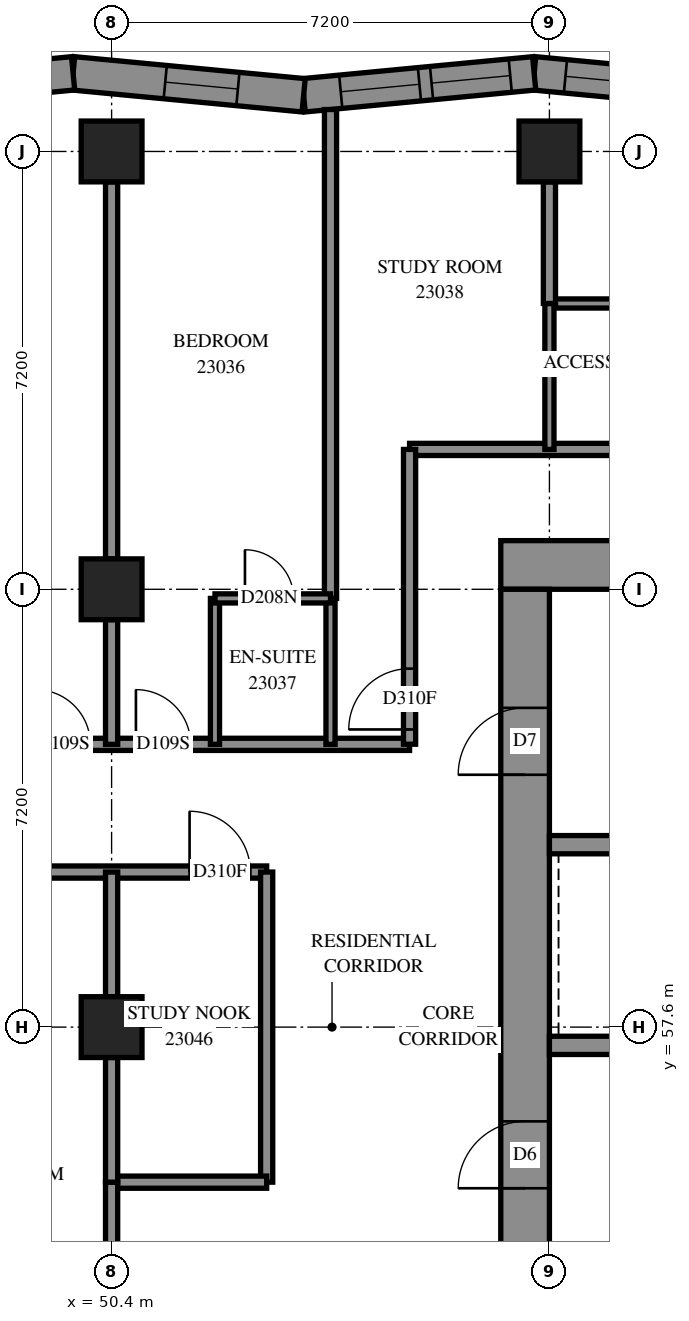
"""IFC4 building model, lengths in metres.
Left out: names, types, materials, properties, quantities, classifications, styles, units other than length and angle.
Written with IfcOpenShell. Run it as: python <this file> out.ifc"""

import sys

from ifc_helpers import new_model, si_unit, direction, frame, frame_2d, origin, origin_2d, place, context, subcontext, project, spatial, polyline, rectangle, outline, extrude, element, fill, save


model = new_model("IFC4")
c1 = context("Model", 3, precision=1e-05, world=origin(), true_north=direction((0.0, 1.0)))
c2 = subcontext(c1, "Body", "Model", "MODEL_VIEW")
j1 = project(units=[si_unit("LENGTHUNIT", "METRE"), si_unit("PLANEANGLEUNIT", "RADIAN")], contexts=[c1])
p1 = place(None, origin())
s1 = spatial("IfcSite", under=j1, at=p1, CompositionType="ELEMENT")
p2 = place(p1, origin())
s2 = spatial("IfcBuilding", under=s1, at=p2, CompositionType="ELEMENT")
p3 = place(p2, frame((0.0, 0.0, 88.0)))
s3 = spatial("IfcBuildingStorey", under=s2, at=p3, CompositionType="ELEMENT", Elevation=88.0)
for number, where, z_axis, x_axis in (
    (1, (50.4, 57.6, 0.0), (0.0, 0.0, 1.0), (1.0, 0.0, 0.0)),
    (2, (50.4, 64.8, 0.0), (0.0, 0.0, 1.0), (1.0, 0.0, 0.0)),
    (3, (50.4, 72.0, 0.0), (0.0, 0.0, 1.0), (1.0, 0.0, 0.0)),
    (4, (57.6, 72.0, 0.0), (0.0, 0.0, 1.0), (1.0, 0.0, 0.0)),
):
    element("IfcColumn", number, at=place(p3, frame(where, z_axis=z_axis, x_axis=x_axis)), inside=s3, PredefinedType="COLUMN", context=c2, shape_type="SweptSolid", body=[
        extrude(rectangle(XDim=1.0, YDim=1.0, at=origin_2d()), origin(), (0.0, 0.0, 1.0), 3.1),
    ])
p4 = place(p3, frame((56.8, 65.2, -0.3), z_axis=(0.0, 0.0, 1.0), x_axis=(1.0, 0.0, 0.0)))
e5 = element("IfcWall", 5, at=p4, inside=s3, PredefinedType="SHEAR", context=c2, shape_type="SweptSolid", body=[
    extrude(rectangle(XDim=16.0, YDim=0.8, at=frame_2d((8.0, 0.0))), origin(), (0.0, 0.0, 1.0), 2.7),
])
p5 = place(p4, frame((10.8, 0.0, 0.3)))
e6 = element("IfcOpeningElement", 6, at=p5, cuts=e5, PredefinedType="OPENING", context=c2, shape_type="SweptSolid", body=[
    extrude(rectangle(XDim=0.8, YDim=2.1, at=frame_2d((0.4, 1.05))), frame((0.0, 0.41, 0.0), z_axis=(0.0, -1.0, 0.0), x_axis=(1.0, 0.0, 0.0)), (0.0, 0.0, 1.0), 0.82),
])
p6 = place(p3, frame((57.2, 50.4, -0.3), z_axis=(0.0, 0.0, 1.0), x_axis=(0.0, 1.0, 0.0)))
e7 = element("IfcWall", 7, at=p6, inside=s3, PredefinedType="SHEAR", context=c2, shape_type="SweptSolid", body=[
    extrude(rectangle(XDim=14.4, YDim=0.8, at=frame_2d((7.2, 0.0))), origin(), (0.0, 0.0, 1.0), 2.7),
])
p7 = place(p6, frame((4.55, 0.0, 0.3)))
e8 = element("IfcOpeningElement", 8, at=p7, cuts=e7, PredefinedType="OPENING", context=c2, shape_type="SweptSolid", body=[
    extrude(rectangle(XDim=1.1, YDim=2.1, at=frame_2d((0.55, 1.05))), frame((0.0, 0.41, 0.0), z_axis=(0.0, -1.0, 0.0), x_axis=(1.0, 0.0, 0.0)), (0.0, 0.0, 1.0), 0.82),
])
p8 = place(p6, frame((11.35, 0.0, 0.3)))
e9 = element("IfcOpeningElement", 9, at=p8, cuts=e7, PredefinedType="OPENING", context=c2, shape_type="SweptSolid", body=[
    extrude(rectangle(XDim=1.1, YDim=2.1, at=frame_2d((0.55, 1.05))), frame((0.0, 0.41, 0.0), z_axis=(0.0, -1.0, 0.0), x_axis=(1.0, 0.0, 0.0)), (0.0, 0.0, 1.0), 0.82),
])
p9 = place(p3, frame((57.6, 57.3, 0.0), z_axis=(0.0, 0.0, 1.0), x_axis=(1.0, 0.0, 0.0)))
e10 = element("IfcWall", 10, at=p9, inside=s3, PredefinedType="SOLIDWALL", context=c2, shape_type="SweptSolid", body=[
    extrude(rectangle(XDim=14.4, YDim=0.3, at=frame_2d((7.2, 0.0))), origin(), (0.0, 0.0, 1.0), 3.1),
])
p10 = place(p9, frame((12.05, 0.0, 0.0)))
e11 = element("IfcOpeningElement", 11, at=p10, cuts=e10, PredefinedType="OPENING", context=c2, shape_type="SweptSolid", body=[
    extrude(rectangle(XDim=1.1, YDim=2.1, at=frame_2d((0.55, 1.05))), frame((0.0, 0.16, 0.0), z_axis=(0.0, -1.0, 0.0), x_axis=(1.0, 0.0, 0.0)), (0.0, 0.0, 1.0), 0.32),
])
p11 = place(p3, frame((57.6, 60.6, 0.0), z_axis=(0.0, 0.0, 1.0), x_axis=(1.0, 0.0, 0.0)))
e12 = element("IfcWall", 12, at=p11, inside=s3, PredefinedType="SOLIDWALL", context=c2, shape_type="SweptSolid", body=[
    extrude(rectangle(XDim=7.2, YDim=0.3, at=frame_2d((3.6, 0.0))), origin(), (0.0, 0.0, 1.0), 3.1),
])
p12 = place(p3, frame((61.14, 72.924, 0.0), z_axis=(0.0, 0.0, 1.0), x_axis=(-0.9954966527, 0.0947967005, 0.0)))
e13 = element("IfcWall", 13, at=p12, inside=s3, PredefinedType="SOLIDWALL", context=c2, shape_type="SweptSolid", body=[
    extrude(outline(polyline([(0.026, -0.275), (3.834, -0.275), (3.782, 0.275), (-0.026, 0.275), (0.026, -0.275)])), origin(), (0.0, 0.0, 1.0), 3.1),
])
p13 = place(p12, frame((0.491, 0.0, 0.5)))
e14 = element("IfcOpeningElement", 14, at=p13, cuts=e13, PredefinedType="OPENING", context=c2, shape_type="SweptSolid", body=[
    extrude(rectangle(XDim=1.3, YDim=2.45, at=frame_2d((0.65, 1.225))), frame((0.0, 0.285, 0.0), z_axis=(0.0, -1.0, 0.0), x_axis=(1.0, 0.0, 0.0)), (0.0, 0.0, 1.0), 0.57),
])
p14 = place(p12, frame((1.991, 0.0, 0.5)))
e15 = element("IfcOpeningElement", 15, at=p14, cuts=e13, PredefinedType="OPENING", context=c2, shape_type="SweptSolid", body=[
    extrude(rectangle(XDim=1.3, YDim=2.45, at=frame_2d((0.65, 1.225))), frame((0.0, 0.285, 0.0), z_axis=(0.0, -1.0, 0.0), x_axis=(1.0, 0.0, 0.0)), (0.0, 0.0, 1.0), 0.57),
])
p15 = place(p3, frame((57.349, 73.285, 0.0), z_axis=(0.0, 0.0, 1.0), x_axis=(-0.9954966527, -0.0947967005, 0.0)))
e16 = element("IfcWall", 16, at=p15, inside=s3, PredefinedType="SOLIDWALL", context=c2, shape_type="SweptSolid", body=[
    extrude(outline(polyline([(-0.026, -0.275), (3.782, -0.275), (3.834, 0.275), (0.026, 0.275), (-0.026, -0.275)])), origin(), (0.0, 0.0, 1.0), 3.1),
])
p16 = place(p15, frame((0.395, 0.0, 0.5)))
e17 = element("IfcOpeningElement", 17, at=p16, cuts=e16, PredefinedType="OPENING", context=c2, shape_type="SweptSolid", body=[
    extrude(rectangle(XDim=1.3, YDim=2.45, at=frame_2d((0.65, 1.225))), frame((0.0, 0.285, 0.0), z_axis=(0.0, -1.0, 0.0), x_axis=(1.0, 0.0, 0.0)), (0.0, 0.0, 1.0), 0.57),
])
p17 = place(p15, frame((1.895, 0.0, 0.5)))
e18 = element("IfcOpeningElement", 18, at=p17, cuts=e16, PredefinedType="OPENING", context=c2, shape_type="SweptSolid", body=[
    extrude(rectangle(XDim=1.3, YDim=2.45, at=frame_2d((0.65, 1.225))), frame((0.0, 0.285, 0.0), z_axis=(0.0, -1.0, 0.0), x_axis=(1.0, 0.0, 0.0)), (0.0, 0.0, 1.0), 0.57),
])
p18 = place(p3, frame((53.558, 72.924, 0.0), z_axis=(0.0, 0.0, 1.0), x_axis=(-0.9954966527, 0.0947967005, 0.0)))
e19 = element("IfcWall", 19, at=p18, inside=s3, PredefinedType="SOLIDWALL", context=c2, shape_type="SweptSolid", body=[
    extrude(outline(polyline([(0.026, -0.275), (3.834, -0.275), (3.782, 0.275), (-0.026, 0.275), (0.026, -0.275)])), origin(), (0.0, 0.0, 1.0), 3.1),
])
p19 = place(p18, frame((1.086, 0.0, 0.5)))
e20 = element("IfcOpeningElement", 20, at=p19, cuts=e19, PredefinedType="OPENING", context=c2, shape_type="SweptSolid", body=[
    extrude(rectangle(XDim=1.2, YDim=2.45, at=frame_2d((0.6, 1.225))), frame((0.0, 0.285, 0.0), z_axis=(0.0, -1.0, 0.0), x_axis=(1.0, 0.0, 0.0)), (0.0, 0.0, 1.0), 0.57),
])
p20 = place(p3, frame((49.767, 73.285, 0.0), z_axis=(0.0, 0.0, 1.0), x_axis=(-0.9954966527, -0.0947967005, 0.0)))
e21 = element("IfcWall", 21, at=p20, inside=s3, PredefinedType="SOLIDWALL", context=c2, shape_type="SweptSolid", body=[
    extrude(outline(polyline([(-0.026, -0.275), (3.782, -0.275), (3.834, 0.275), (0.026, 0.275), (-0.026, -0.275)])), origin(), (0.0, 0.0, 1.0), 3.1),
])
p21 = place(p20, frame((1.003, 0.0, 0.5)))
e22 = element("IfcOpeningElement", 22, at=p21, cuts=e21, PredefinedType="OPENING", context=c2, shape_type="SweptSolid", body=[
    extrude(rectangle(XDim=1.2, YDim=2.45, at=frame_2d((0.6, 1.225))), frame((0.0, 0.285, 0.0), z_axis=(0.0, -1.0, 0.0), x_axis=(1.0, 0.0, 0.0)), (0.0, 0.0, 1.0), 0.57),
])
p22 = place(p3, frame((28.8, 60.15, 0.0), z_axis=(0.0, 0.0, 1.0), x_axis=(1.0, 0.0, 0.0)))
e23 = element("IfcWall", 23, at=p22, inside=s3, PredefinedType="PARTITIONING", context=c2, shape_type="SweptSolid", body=[
    extrude(rectangle(XDim=24.15, YDim=0.2, at=frame_2d((12.075, 0.0))), origin(), (0.0, 0.0, 1.0), 3.1),
])
p23 = place(p22, frame((11.325, 0.0, 0.0)))
e24 = element("IfcOpeningElement", 24, at=p23, cuts=e23, PredefinedType="OPENING", context=c2, shape_type="SweptSolid", body=[
    extrude(rectangle(XDim=1.0, YDim=2.1, at=frame_2d((0.5, 1.05))), frame((0.0, 0.11, 0.0), z_axis=(0.0, -1.0, 0.0), x_axis=(1.0, 0.0, 0.0)), (0.0, 0.0, 1.0), 0.22),
])
p24 = place(p22, frame((14.8, 0.0, 0.0)))
e25 = element("IfcOpeningElement", 25, at=p24, cuts=e23, PredefinedType="OPENING", context=c2, shape_type="SweptSolid", body=[
    extrude(rectangle(XDim=0.9, YDim=2.1, at=frame_2d((0.45, 1.05))), frame((0.0, 0.11, 0.0), z_axis=(0.0, -1.0, 0.0), x_axis=(1.0, 0.0, 0.0)), (0.0, 0.0, 1.0), 0.22),
])
p25 = place(p22, frame((18.508, 0.0, 0.0)))
e26 = element("IfcOpeningElement", 26, at=p25, cuts=e23, PredefinedType="OPENING", context=c2, shape_type="SweptSolid", body=[
    extrude(rectangle(XDim=1.0, YDim=2.1, at=frame_2d((0.5, 1.05))), frame((0.0, 0.11, 0.0), z_axis=(0.0, -1.0, 0.0), x_axis=(1.0, 0.0, 0.0)), (0.0, 0.0, 1.0), 0.22),
])
p26 = place(p22, frame((22.882, 0.0, 0.0)))
e27 = element("IfcOpeningElement", 27, at=p26, cuts=e23, PredefinedType="OPENING", context=c2, shape_type="SweptSolid", body=[
    extrude(rectangle(XDim=1.0, YDim=2.1, at=frame_2d((0.5, 1.05))), frame((0.0, 0.11, 0.0), z_axis=(0.0, -1.0, 0.0), x_axis=(1.0, 0.0, 0.0)), (0.0, 0.0, 1.0), 0.22),
])
p27 = place(p3, frame((33.45, 62.25, 0.0), z_axis=(0.0, 0.0, 1.0), x_axis=(1.0, 0.0, 0.0)))
e28 = element("IfcWall", 28, at=p27, inside=s3, PredefinedType="PARTITIONING", context=c2, shape_type="SweptSolid", body=[
    extrude(rectangle(XDim=21.85, YDim=0.2, at=frame_2d((10.925, 0.0))), origin(), (0.0, 0.0, 1.0), 3.1),
])
p28 = place(p27, frame((0.144, 0.0, 0.0)))
e29 = element("IfcOpeningElement", 29, at=p28, cuts=e28, PredefinedType="OPENING", context=c2, shape_type="SweptSolid", body=[
    extrude(rectangle(XDim=1.0, YDim=2.1, at=frame_2d((0.5, 1.05))), frame((0.0, 0.11, 0.0), z_axis=(0.0, -1.0, 0.0), x_axis=(1.0, 0.0, 0.0)), (0.0, 0.0, 1.0), 0.22),
])
p29 = place(p27, frame((2.95, 0.0, 0.0)))
e30 = element("IfcOpeningElement", 30, at=p29, cuts=e28, PredefinedType="OPENING", context=c2, shape_type="SweptSolid", body=[
    extrude(rectangle(XDim=0.9, YDim=2.1, at=frame_2d((0.45, 1.05))), frame((0.0, 0.11, 0.0), z_axis=(0.0, -1.0, 0.0), x_axis=(1.0, 0.0, 0.0)), (0.0, 0.0, 1.0), 0.22),
])
p30 = place(p27, frame((8.407, 0.0, 0.0)))
e31 = element("IfcOpeningElement", 31, at=p30, cuts=e28, PredefinedType="OPENING", context=c2, shape_type="SweptSolid", body=[
    extrude(rectangle(XDim=0.9, YDim=2.1, at=frame_2d((0.45, 1.05))), frame((0.0, 0.11, 0.0), z_axis=(0.0, -1.0, 0.0), x_axis=(1.0, 0.0, 0.0)), (0.0, 0.0, 1.0), 0.22),
])
p31 = place(p27, frame((15.7, 0.0, 0.0)))
e32 = element("IfcOpeningElement", 32, at=p31, cuts=e28, PredefinedType="OPENING", context=c2, shape_type="SweptSolid", body=[
    extrude(rectangle(XDim=0.9, YDim=2.1, at=frame_2d((0.45, 1.05))), frame((0.0, 0.11, 0.0), z_axis=(0.0, -1.0, 0.0), x_axis=(1.0, 0.0, 0.0)), (0.0, 0.0, 1.0), 0.22),
])
p32 = place(p27, frame((17.35, 0.0, 0.0)))
e33 = element("IfcOpeningElement", 33, at=p32, cuts=e28, PredefinedType="OPENING", context=c2, shape_type="SweptSolid", body=[
    extrude(rectangle(XDim=0.9, YDim=2.1, at=frame_2d((0.45, 1.05))), frame((0.0, 0.11, 0.0), z_axis=(0.0, -1.0, 0.0), x_axis=(1.0, 0.0, 0.0)), (0.0, 0.0, 1.0), 0.22),
])
p33 = place(p3, frame((55.3, 67.1, 0.0), z_axis=(0.0, 0.0, 1.0), x_axis=(1.0, 0.0, 0.0)))
e34 = element("IfcWall", 34, at=p33, inside=s3, PredefinedType="PARTITIONING", context=c2, shape_type="SweptSolid", body=[
    extrude(rectangle(XDim=19.0, YDim=0.2, at=frame_2d((9.5, 0.0))), origin(), (0.0, 0.0, 1.0), 3.1),
])
p34 = place(p33, frame((6.161, 0.0, 0.0)))
e35 = element("IfcOpeningElement", 35, at=p34, cuts=e34, PredefinedType="OPENING", context=c2, shape_type="SweptSolid", body=[
    extrude(rectangle(XDim=0.9, YDim=2.1, at=frame_2d((0.45, 1.05))), frame((0.0, 0.11, 0.0), z_axis=(0.0, -1.0, 0.0), x_axis=(1.0, 0.0, 0.0)), (0.0, 0.0, 1.0), 0.22),
])
p35 = place(p33, frame((13.386, 0.0, 0.0)))
e36 = element("IfcOpeningElement", 36, at=p35, cuts=e34, PredefinedType="OPENING", context=c2, shape_type="SweptSolid", body=[
    extrude(rectangle(XDim=1.0, YDim=2.1, at=frame_2d((0.5, 1.05))), frame((0.0, 0.11, 0.0), z_axis=(0.0, -1.0, 0.0), x_axis=(1.0, 0.0, 0.0)), (0.0, 0.0, 1.0), 0.22),
])
p36 = place(p3, frame((54.0, 64.65, 0.0), z_axis=(0.0, 0.0, 1.0), x_axis=(0.0, 1.0, 0.0)))
e37 = element("IfcWall", 37, at=p36, inside=s3, PredefinedType="PARTITIONING", context=c2, shape_type="SweptSolid", body=[
    extrude(rectangle(XDim=8.04, YDim=0.2, at=frame_2d((4.02, 0.0))), origin(), (0.0, 0.0, 1.0), 3.1),
])
p37 = place(p3, frame((50.4, 65.3, 0.0), z_axis=(0.0, 0.0, 1.0), x_axis=(0.0, 1.0, 0.0)))
e38 = element("IfcWall", 38, at=p37, inside=s3, PredefinedType="PARTITIONING", context=c2, shape_type="SweptSolid", body=[
    extrude(rectangle(XDim=6.2, YDim=0.2, at=frame_2d((3.1, 0.0))), origin(), (0.0, 0.0, 1.0), 3.1),
])
p38 = place(p3, frame((52.95, 55.05, 0.0), z_axis=(0.0, 0.0, 1.0), x_axis=(0.0, 1.0, 0.0)))
e39 = element("IfcWall", 39, at=p38, inside=s3, PredefinedType="PARTITIONING", context=c2, shape_type="SweptSolid", body=[
    extrude(rectangle(XDim=5.1, YDim=0.2, at=frame_2d((2.55, 0.0))), origin(), (0.0, 0.0, 1.0), 3.1),
])
p39 = place(p3, frame((55.3, 62.252, 0.0), z_axis=(0.0, 0.0, 1.0), x_axis=(0.0, 1.0, 0.0)))
e40 = element("IfcWall", 40, at=p39, inside=s3, PredefinedType="PARTITIONING", context=c2, shape_type="SweptSolid", body=[
    extrude(rectangle(XDim=4.848, YDim=0.2, at=frame_2d((2.424, 0.0))), origin(), (0.0, 0.0, 1.0), 3.1),
])
p40 = place(p39, frame((0.243, 0.0, 0.0)))
e41 = element("IfcOpeningElement", 41, at=p40, cuts=e40, PredefinedType="OPENING", context=c2, shape_type="SweptSolid", body=[
    extrude(rectangle(XDim=1.0, YDim=2.1, at=frame_2d((0.5, 1.05))), frame((0.0, 0.11, 0.0), z_axis=(0.0, -1.0, 0.0), x_axis=(1.0, 0.0, 0.0)), (0.0, 0.0, 1.0), 0.22),
])
p41 = place(p3, frame((57.6, 69.5, 0.0), z_axis=(0.0, 0.0, 1.0), x_axis=(1.0, 0.0, 0.0)))
e42 = element("IfcWall", 42, at=p41, inside=s3, PredefinedType="PARTITIONING", context=c2, shape_type="SweptSolid", body=[
    extrude(rectangle(XDim=3.2, YDim=0.15, at=frame_2d((1.6, 0.0))), origin(), (0.0, 0.0, 1.0), 3.1),
])
p42 = place(p41, frame((1.196, 0.0, 0.0)))
e43 = element("IfcOpeningElement", 43, at=p42, cuts=e42, PredefinedType="OPENING", context=c2, shape_type="SweptSolid", body=[
    extrude(rectangle(XDim=0.8, YDim=2.1, at=frame_2d((0.4, 1.05))), frame((0.0, 0.085, 0.0), z_axis=(0.0, -1.0, 0.0), x_axis=(1.0, 0.0, 0.0)), (0.0, 0.0, 1.0), 0.17),
])
p43 = place(p3, frame((50.4, 55.05, 0.0), z_axis=(0.0, 0.0, 1.0), x_axis=(1.0, 0.0, 0.0)))
e44 = element("IfcWall", 44, at=p43, inside=s3, PredefinedType="PARTITIONING", context=c2, shape_type="SweptSolid", body=[
    extrude(rectangle(XDim=2.55, YDim=0.2, at=frame_2d((1.275, 0.0))), origin(), (0.0, 0.0, 1.0), 3.1),
])
for number, where, z_axis, x_axis in (
    (45, (52.1, 62.25, 0.0), (0.0, 0.0, 1.0), (0.0, 1.0, 0.0)),
    (46, (54.0, 62.25, 0.0), (0.0, 0.0, 1.0), (0.0, 1.0, 0.0)),
    (47, (57.6, 67.1, 0.0), (0.0, 0.0, 1.0), (0.0, 1.0, 0.0)),
):
    element("IfcWall", number, at=place(p3, frame(where, z_axis=z_axis, x_axis=x_axis)), inside=s3, PredefinedType="PARTITIONING", context=c2, shape_type="SweptSolid", body=[
        extrude(rectangle(XDim=2.4, YDim=0.15, at=frame_2d((1.2, 0.0))), origin(), (0.0, 0.0, 1.0), 3.1),
    ])
p44 = place(p3, frame((50.4, 52.95, 0.0), z_axis=(0.0, 0.0, 1.0), x_axis=(0.0, 1.0, 0.0)))
e48 = element("IfcWall", 48, at=p44, inside=s3, PredefinedType="PARTITIONING", context=c2, shape_type="SweptSolid", body=[
    extrude(rectangle(XDim=2.1, YDim=0.2, at=frame_2d((1.05, 0.0))), origin(), (0.0, 0.0, 1.0), 3.1),
])
for number, where, z_axis, x_axis in (
    (49, (50.4, 55.05, 0.0), (0.0, 0.0, 1.0), (0.0, 1.0, 0.0)),
    (50, (50.4, 58.1, 0.0), (0.0, 0.0, 1.0), (0.0, 1.0, 0.0)),
    (51, (50.4, 62.25, 0.0), (0.0, 0.0, 1.0), (0.0, 1.0, 0.0)),
):
    element("IfcWall", number, at=place(p3, frame(where, z_axis=z_axis, x_axis=x_axis)), inside=s3, PredefinedType="PARTITIONING", context=c2, shape_type="SweptSolid", body=[
        extrude(rectangle(XDim=2.05, YDim=0.2, at=frame_2d((1.025, 0.0))), origin(), (0.0, 0.0, 1.0), 3.1),
    ])
p45 = place(p3, frame((57.6, 69.5, 0.0), z_axis=(0.0, 0.0, 1.0), x_axis=(0.0, 1.0, 0.0)))
e52 = element("IfcWall", 52, at=p45, inside=s3, PredefinedType="PARTITIONING", context=c2, shape_type="SweptSolid", body=[
    extrude(rectangle(XDim=2.0, YDim=0.2, at=frame_2d((1.0, 0.0))), origin(), (0.0, 0.0, 1.0), 3.1),
])
p46 = place(p3, frame((52.1, 64.65, 0.0), z_axis=(0.0, 0.0, 1.0), x_axis=(1.0, 0.0, 0.0)))
e53 = element("IfcWall", 53, at=p46, inside=s3, PredefinedType="PARTITIONING", context=c2, shape_type="SweptSolid", body=[
    extrude(rectangle(XDim=1.9, YDim=0.15, at=frame_2d((0.95, 0.0))), origin(), (0.0, 0.0, 1.0), 3.1),
])
p47 = place(p46, frame((0.493, 0.0, 0.0)))
e54 = element("IfcOpeningElement", 54, at=p47, cuts=e53, PredefinedType="OPENING", context=c2, shape_type="SweptSolid", body=[
    extrude(rectangle(XDim=0.8, YDim=2.1, at=frame_2d((0.4, 1.05))), frame((0.0, 0.085, 0.0), z_axis=(0.0, -1.0, 0.0), x_axis=(1.0, 0.0, 0.0)), (0.0, 0.0, 1.0), 0.17),
])
p48 = place(p14, origin())
e55 = element("IfcWindow", 55, at=p48, inside=s3, PartitioningType="SINGLE_PANEL", PredefinedType="WINDOW", context=c2, shape_type="SweptSolid", body=[
    extrude(rectangle(XDim=1.3, YDim=2.45, at=frame_2d((0.65, 1.225))), frame((0.0, 0.155, 0.0), z_axis=(0.0, -1.0, 0.0), x_axis=(1.0, 0.0, 0.0)), (0.0, 0.0, 1.0), 0.06),
])
fill(e15, e55)
p49 = place(p16, origin())
e56 = element("IfcWindow", 56, at=p49, inside=s3, PartitioningType="SINGLE_PANEL", PredefinedType="WINDOW", context=c2, shape_type="SweptSolid", body=[
    extrude(rectangle(XDim=1.3, YDim=2.45, at=frame_2d((0.65, 1.225))), frame((0.0, 0.155, 0.0), z_axis=(0.0, -1.0, 0.0), x_axis=(1.0, 0.0, 0.0)), (0.0, 0.0, 1.0), 0.06),
])
fill(e17, e56)
p50 = place(p17, origin())
e57 = element("IfcWindow", 57, at=p50, inside=s3, PartitioningType="SINGLE_PANEL", PredefinedType="WINDOW", context=c2, shape_type="SweptSolid", body=[
    extrude(rectangle(XDim=1.3, YDim=2.45, at=frame_2d((0.65, 1.225))), frame((0.0, 0.155, 0.0), z_axis=(0.0, -1.0, 0.0), x_axis=(1.0, 0.0, 0.0)), (0.0, 0.0, 1.0), 0.06),
])
fill(e18, e57)
p51 = place(p19, origin())
e58 = element("IfcWindow", 58, at=p51, inside=s3, PartitioningType="SINGLE_PANEL", PredefinedType="WINDOW", context=c2, shape_type="SweptSolid", body=[
    extrude(rectangle(XDim=1.2, YDim=2.45, at=frame_2d((0.6, 1.225))), frame((0.0, 0.155, 0.0), z_axis=(0.0, -1.0, 0.0), x_axis=(1.0, 0.0, 0.0)), (0.0, 0.0, 1.0), 0.06),
])
fill(e20, e58)
p52 = place(p7, origin())
e59 = element("IfcDoor", 59, at=p52, inside=s3, OperationType="DOUBLE_DOOR_SINGLE_SWING", PredefinedType="DOOR", context=c2, shape_type="SweptSolid", body=[
    extrude(rectangle(XDim=1.1, YDim=2.1, at=frame_2d((0.55, 1.05))), frame((0.0, 0.025, 0.0), z_axis=(0.0, -1.0, 0.0), x_axis=(1.0, 0.0, 0.0)), (0.0, 0.0, 1.0), 0.05),
])
fill(e8, e59)
p53 = place(p8, origin())
e60 = element("IfcDoor", 60, at=p53, inside=s3, OperationType="SINGLE_SWING_LEFT", PredefinedType="DOOR", context=c2, shape_type="SweptSolid", body=[
    extrude(rectangle(XDim=1.1, YDim=2.1, at=frame_2d((0.55, 1.05))), frame((0.0, 0.025, 0.0), z_axis=(0.0, -1.0, 0.0), x_axis=(1.0, 0.0, 0.0)), (0.0, 0.0, 1.0), 0.05),
])
fill(e9, e60)
p54 = place(p31, origin())
e61 = element("IfcDoor", 61, at=p54, inside=s3, OperationType="SINGLE_SWING_LEFT", PredefinedType="DOOR", context=c2, shape_type="SweptSolid", body=[
    extrude(rectangle(XDim=0.9, YDim=2.1, at=frame_2d((0.45, 1.05))), frame((0.0, 0.025, 0.0), z_axis=(0.0, -1.0, 0.0), x_axis=(1.0, 0.0, 0.0)), (0.0, 0.0, 1.0), 0.05),
])
fill(e32, e61)
p55 = place(p32, origin())
e62 = element("IfcDoor", 62, at=p55, inside=s3, OperationType="SINGLE_SWING_RIGHT", PredefinedType="DOOR", context=c2, shape_type="SweptSolid", body=[
    extrude(rectangle(XDim=0.9, YDim=2.1, at=frame_2d((0.45, 1.05))), frame((0.0, 0.025, 0.0), z_axis=(0.0, -1.0, 0.0), x_axis=(1.0, 0.0, 0.0)), (0.0, 0.0, 1.0), 0.05),
])
fill(e33, e62)
p56 = place(p47, origin())
e63 = element("IfcDoor", 63, at=p56, inside=s3, OperationType="SINGLE_SWING_RIGHT", PredefinedType="DOOR", context=c2, shape_type="SweptSolid", body=[
    extrude(rectangle(XDim=0.8, YDim=2.1, at=frame_2d((0.4, 1.05))), frame((0.0, 0.025, 0.0), z_axis=(0.0, -1.0, 0.0), x_axis=(1.0, 0.0, 0.0)), (0.0, 0.0, 1.0), 0.05),
])
fill(e54, e63)
p57 = place(p40, origin())
e64 = element("IfcDoor", 64, at=p57, inside=s3, OperationType="SINGLE_SWING_LEFT", PredefinedType="DOOR", context=c2, shape_type="SweptSolid", body=[
    extrude(rectangle(XDim=1.0, YDim=2.1, at=frame_2d((0.5, 1.05))), frame((0.0, 0.025, 0.0), z_axis=(0.0, -1.0, 0.0), x_axis=(1.0, 0.0, 0.0)), (0.0, 0.0, 1.0), 0.05),
])
fill(e41, e64)
p58 = place(p26, origin())
e65 = element("IfcDoor", 65, at=p58, inside=s3, OperationType="SINGLE_SWING_LEFT", PredefinedType="DOOR", context=c2, shape_type="SweptSolid", body=[
    extrude(rectangle(XDim=1.0, YDim=2.1, at=frame_2d((0.5, 1.05))), frame((0.0, 0.025, 0.0), z_axis=(0.0, -1.0, 0.0), x_axis=(1.0, 0.0, 0.0)), (0.0, 0.0, 1.0), 0.05),
])
fill(e27, e65)
save(model, sys.argv[1])
